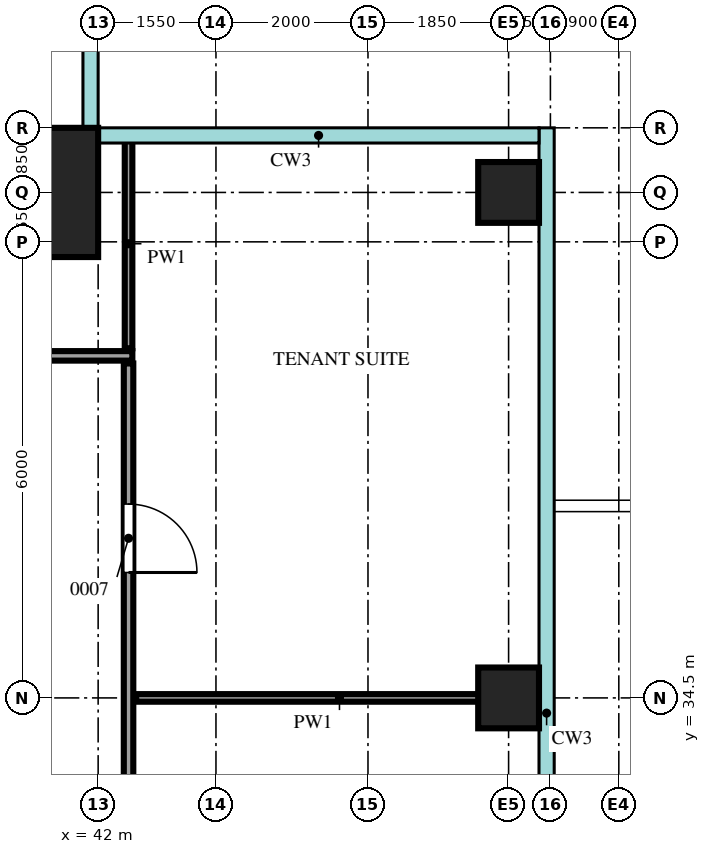
"""IFC4 building model, lengths in metres.
Left out: names, types, materials, properties, quantities, classifications, styles, units other than length and angle.
Written with IfcOpenShell. Run it as: python <this file> out.ifc"""

import sys

from ifc_helpers import new_model, si_unit, direction, frame, frame_2d, origin, origin_2d, place, context, subcontext, project, spatial, rectangle, extrude, source, transform, mapped, element, fill, save


model = new_model("IFC4")
c1 = context("Model", 3, precision=1e-05, world=origin(), true_north=direction((0.0, 1.0)))
c2 = subcontext(c1, "Body", "Model", "MODEL_VIEW")
j1 = project(units=[si_unit("LENGTHUNIT", "METRE"), si_unit("PLANEANGLEUNIT", "RADIAN")], contexts=[c1])
p1 = place(None, origin())
s1 = spatial("IfcSite", under=j1, at=p1, CompositionType="ELEMENT")
p2 = place(p1, origin())
s2 = spatial("IfcBuilding", under=s1, at=p2, CompositionType="ELEMENT")
p3 = place(p2, frame((0.0, 0.0, 290.2)))
s3 = spatial("IfcBuildingStorey", under=s2, at=p3, CompositionType="ELEMENT", Elevation=290.2)
m1 = source(origin(), c2, "Body", "SweptSolid", [
    extrude(rectangle(XDim=1.7, YDim=1.7, at=origin_2d()), origin(), (0.0, 0.0, 1.0), 3.75),
])
p4 = place(p3, frame((41.15, 41.15, 0.0), z_axis=(0.0, 0.0, 1.0), x_axis=(1.0, 0.0, 0.0)))
e1 = element("IfcColumn", 1, at=p4, inside=s3, PredefinedType="COLUMN", context=c2, shape_type="MappedRepresentation", body=[
    mapped(m1, transform((0.0, 0.0, 0.0))),
])
m2 = source(origin(), c2, "Body", "SweptSolid", [
    extrude(rectangle(XDim=0.8, YDim=0.8, at=origin_2d()), origin(), (0.0, 0.0, 1.0), 3.75),
])
for number, where, z_axis, x_axis in (
    (2, (47.4, 34.5, 0.0), (0.0, 0.0, 1.0), (1.0, 0.0, 0.0)),
    (3, (47.4, 41.15, 0.0), (0.0, 0.0, 1.0), (1.0, 0.0, 0.0)),
):
    element("IfcColumn", number, at=place(p3, frame(where, z_axis=z_axis, x_axis=x_axis)), inside=s3, PredefinedType="COLUMN", context=c2, shape_type="MappedRepresentation", body=[
        mapped(m2, transform((0.0, 0.0, 0.0))),
    ])
m3 = source(origin(), c2, "Body", "SweptSolid", [
    extrude(rectangle(XDim=23.8, YDim=0.125, at=frame_2d((11.9, 0.0))), origin(), (0.0, 0.0, 1.0), 3.8),
])
p5 = place(p3, frame((42.4, 15.1, 0.0), z_axis=(0.0, 0.0, 1.0), x_axis=(0.0, 1.0, 0.0)))
e4 = element("IfcWall", 4, at=p5, inside=s3, PredefinedType="PARTITIONING", context=c2, shape_type="MappedRepresentation", body=[
    mapped(m3, transform((0.0, 0.0, 0.0))),
])
m4 = source(origin(), c2, "Body", "SweptSolid", [
    extrude(rectangle(XDim=0.9, YDim=2.1, at=frame_2d((0.45, 1.05))), frame((0.0, 0.073, 0.0), z_axis=(0.0, -1.0, 0.0), x_axis=(1.0, 0.0, 0.0)), (0.0, 0.0, 1.0), 0.145),
])
p6 = place(p5, frame((5.3, 0.0, 0.0)))
e5 = element("IfcOpeningElement", 5, at=p6, cuts=e4, PredefinedType="OPENING", context=c2, shape_type="MappedRepresentation", body=[
    mapped(m4, transform((0.0, 0.0, 0.0))),
])
p7 = place(p5, frame((15.35, 0.0, 0.0)))
e6 = element("IfcOpeningElement", 6, at=p7, cuts=e4, PredefinedType="OPENING", context=c2, shape_type="MappedRepresentation", body=[
    mapped(m4, transform((0.0, 0.0, 0.0))),
])
p8 = place(p5, frame((21.05, 0.0, 0.0)))
e7 = element("IfcOpeningElement", 7, at=p8, cuts=e4, PredefinedType="OPENING", context=c2, shape_type="MappedRepresentation", body=[
    mapped(m4, transform((0.0, 0.0, 0.0))),
])
m5 = source(origin(), c2, "Body", "SweptSolid", [
    extrude(rectangle(XDim=5.35, YDim=0.1, at=frame_2d((2.675, 0.0))), origin(), (0.0, 0.0, 1.0), 3.8),
])
p9 = place(p3, frame((42.5, 34.5, 0.0), z_axis=(0.0, 0.0, 1.0), x_axis=(1.0, 0.0, 0.0)))
e8 = element("IfcWall", 8, at=p9, inside=s3, PredefinedType="PARTITIONING", context=c2, shape_type="MappedRepresentation", body=[
    mapped(m5, transform((0.0, 0.0, 0.0))),
])
m6 = source(origin(), c2, "Body", "SweptSolid", [
    extrude(rectangle(XDim=12.1, YDim=0.125, at=frame_2d((6.05, 0.0))), origin(), (0.0, 0.0, 1.0), 3.8),
])
p10 = place(p3, frame((30.35, 39.0, 0.0), z_axis=(0.0, 0.0, 1.0), x_axis=(1.0, 0.0, 0.0)))
e9 = element("IfcWall", 9, at=p10, inside=s3, PredefinedType="PARTITIONING", context=c2, shape_type="MappedRepresentation", body=[
    mapped(m6, transform((0.0, 0.0, 0.0))),
])
p11 = place(p10, frame((6.3, 0.0, 0.0)))
e10 = element("IfcOpeningElement", 10, at=p11, cuts=e9, PredefinedType="OPENING", context=c2, shape_type="MappedRepresentation", body=[
    mapped(m4, transform((0.0, 0.0, 0.0))),
])
m7 = source(origin(), c2, "Body", "SweptSolid", [
    extrude(rectangle(XDim=2.75, YDim=0.1, at=frame_2d((1.375, 0.0))), origin(), (0.0, 0.0, 1.0), 3.8),
])
p12 = place(p3, frame((42.4, 39.1, 0.0), z_axis=(0.0, 0.0, 1.0), x_axis=(0.0, 1.0, 0.0)))
e11 = element("IfcWall", 11, at=p12, inside=s3, PredefinedType="PARTITIONING", context=c2, shape_type="MappedRepresentation", body=[
    mapped(m7, transform((0.0, 0.0, 0.0))),
])
m8 = source(origin(), c2, "Body", "SweptSolid", [
    extrude(rectangle(XDim=0.9, YDim=2.1, at=frame_2d((0.45, 1.05))), frame((0.0, 0.025, 0.0), z_axis=(0.0, -1.0, 0.0), x_axis=(1.0, 0.0, 0.0)), (0.0, 0.0, 1.0), 0.05),
])
p13 = place(p8, origin())
e12 = element("IfcDoor", 12, at=p13, inside=s3, OperationType="SINGLE_SWING_LEFT", PredefinedType="DOOR", context=c2, shape_type="MappedRepresentation", body=[
    mapped(m8, transform((0.0, 0.0, 0.0))),
])
fill(e7, e12)
save(model, sys.argv[1])
